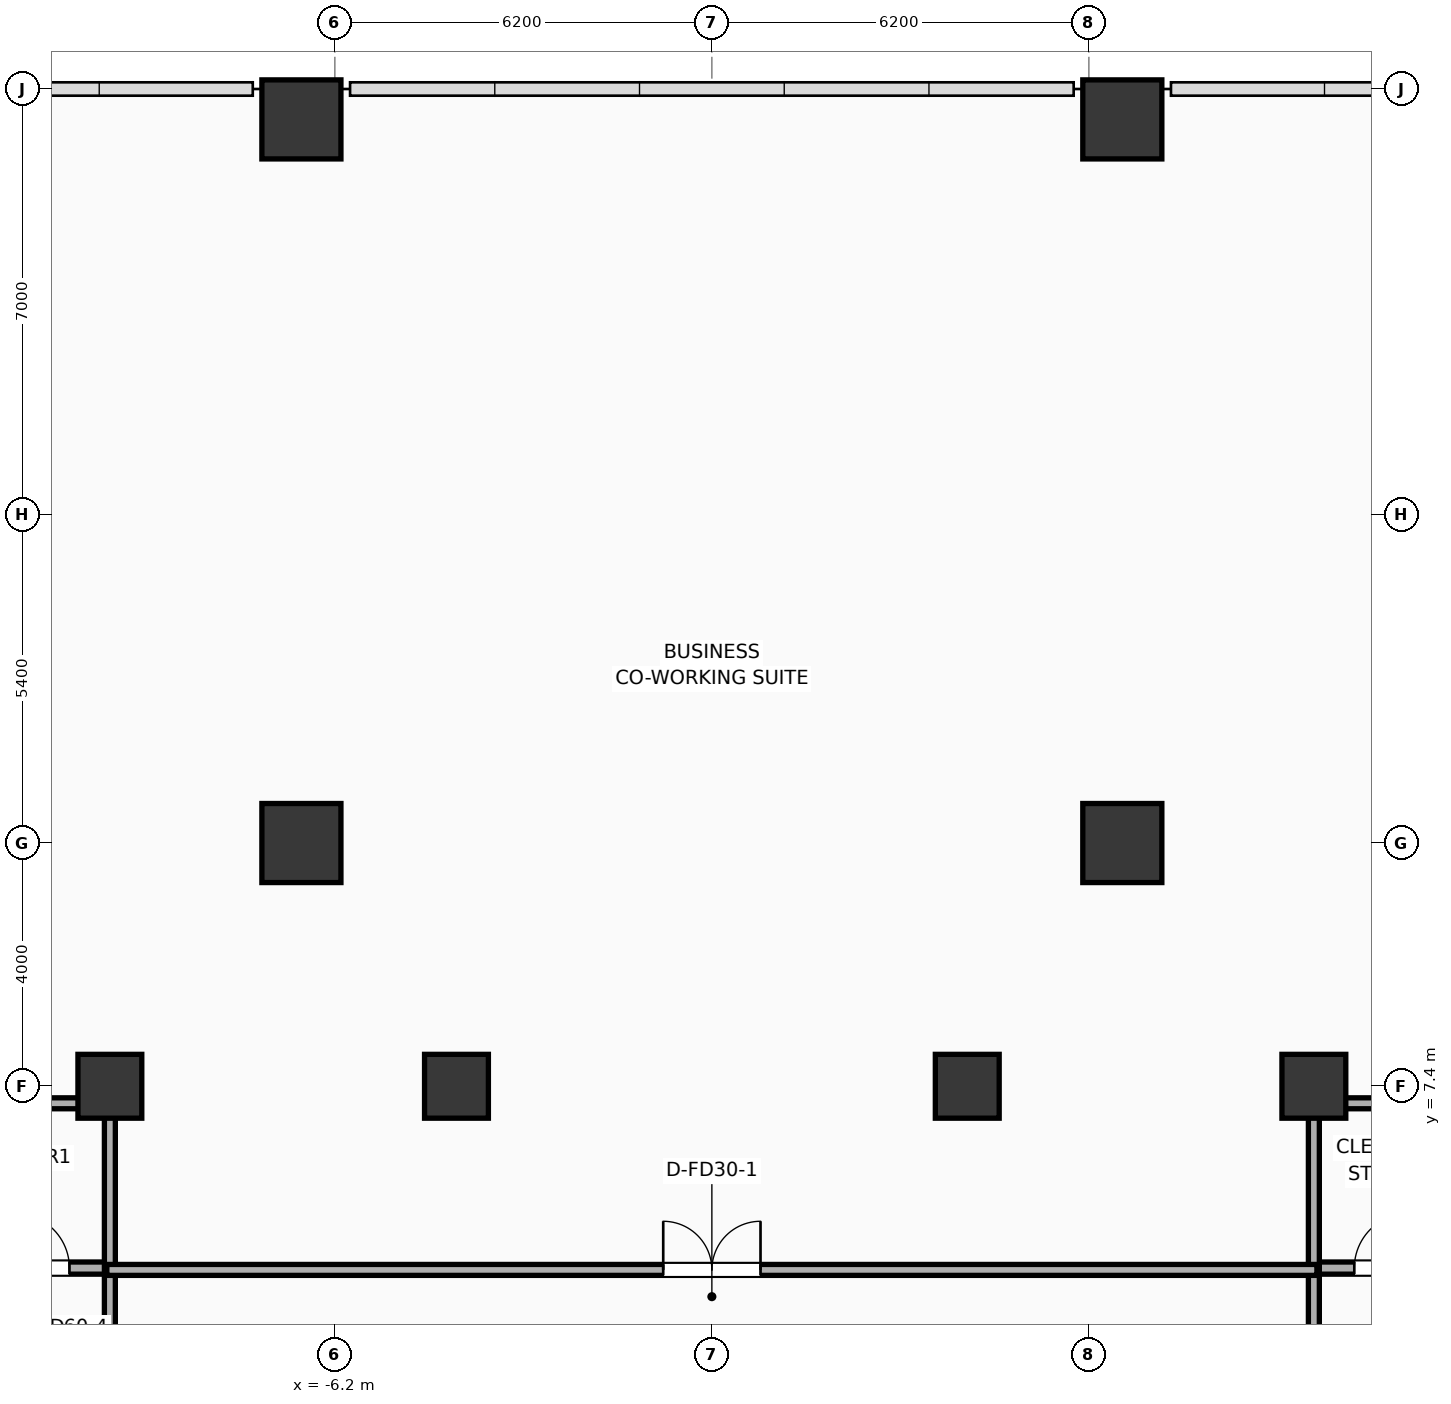
"""IFC4 building model, lengths in metres.
Left out: names, types, materials, properties, quantities, classifications, styles, units other than length and angle.
Written with IfcOpenShell. Run it as: python <this file> out.ifc"""

import sys

from ifc_helpers import new_model, si_unit, direction, frame, frame_2d, origin, origin_2d, place, context, subcontext, project, spatial, rectangle, extrude, element, fill, save


model = new_model("IFC4")
c1 = context("Model", 3, precision=1e-05, world=origin(), true_north=direction((0.0, 1.0)))
c2 = subcontext(c1, "Body", "Model", "MODEL_VIEW")
j1 = project(units=[si_unit("LENGTHUNIT", "METRE"), si_unit("PLANEANGLEUNIT", "RADIAN")], contexts=[c1])
p1 = place(None, origin())
s1 = spatial("IfcSite", under=j1, at=p1, CompositionType="ELEMENT")
p2 = place(p1, origin())
s2 = spatial("IfcBuilding", under=s1, at=p2, CompositionType="ELEMENT")
p3 = place(p2, frame((0.0, 0.0, 20.8)))
s3 = spatial("IfcBuildingStorey", under=s2, at=p3, CompositionType="ELEMENT", Elevation=20.8)
for number, where, z_axis, x_axis in (
    (1, (-6.75, 11.4, 0.0), (0.0, 0.0, 1.0), (1.0, 0.0, 0.0)),
    (2, (-6.75, 23.3, 0.0), (0.0, 0.0, 1.0), (1.0, 0.0, 0.0)),
    (3, (6.75, 11.4, 0.0), (0.0, 0.0, 1.0), (1.0, 0.0, 0.0)),
    (4, (6.75, 23.3, 0.0), (0.0, 0.0, 1.0), (1.0, 0.0, 0.0)),
):
    element("IfcColumn", number, at=place(p3, frame(where, z_axis=z_axis, x_axis=x_axis)), inside=s3, PredefinedType="COLUMN", context=c2, shape_type="SweptSolid", body=[
        extrude(rectangle(XDim=1.3, YDim=1.3, at=origin_2d()), origin(), (0.0, 0.0, 1.0), 5.2),
    ])
for number, where, z_axis, x_axis in (
    (5, (-9.9, 7.4, 0.0), (0.0, 0.0, 1.0), (1.0, 0.0, 0.0)),
    (6, (9.9, 7.4, 0.0), (0.0, 0.0, 1.0), (1.0, 0.0, 0.0)),
    (7, (-4.2, 7.4, 0.0), (0.0, 0.0, 1.0), (1.0, 0.0, 0.0)),
    (8, (4.2, 7.4, 0.0), (0.0, 0.0, 1.0), (1.0, 0.0, 0.0)),
):
    element("IfcColumn", number, at=place(p3, frame(where, z_axis=z_axis, x_axis=x_axis)), inside=s3, PredefinedType="COLUMN", context=c2, shape_type="SweptSolid", body=[
        extrude(rectangle(XDim=1.05, YDim=1.05, at=origin_2d()), origin(), (0.0, 0.0, 1.0), 5.2),
    ])
p4 = place(p3, frame((-12.15, 4.41, 0.0), z_axis=(0.0, 0.0, 1.0), x_axis=(1.0, 0.0, 0.0)))
e9 = element("IfcWall", 9, at=p4, inside=s3, PredefinedType="PARTITIONING", context=c2, shape_type="SweptSolid", body=[
    extrude(rectangle(XDim=2.27, YDim=0.2, at=frame_2d((1.135, 0.0))), origin(), (0.0, 0.0, 1.0), 4.95),
])
p5 = place(p4, frame((0.685, 0.0, 0.0)))
e10 = element("IfcOpeningElement", 10, at=p5, cuts=e9, PredefinedType="OPENING", context=c2, shape_type="SweptSolid", body=[
    extrude(rectangle(XDim=0.9, YDim=2.05, at=frame_2d((0.45, 1.025))), frame((0.0, 0.11, 0.0), z_axis=(0.0, -1.0, 0.0), x_axis=(1.0, 0.0, 0.0)), (0.0, 0.0, 1.0), 0.22),
])
p6 = place(p3, frame((-12.15, 7.12, 0.0), z_axis=(0.0, 0.0, 1.0), x_axis=(1.0, 0.0, 0.0)))
e11 = element("IfcWall", 11, at=p6, inside=s3, PredefinedType="PARTITIONING", context=c2, shape_type="SweptSolid", body=[
    extrude(rectangle(XDim=2.27, YDim=0.18, at=frame_2d((1.135, 0.0))), origin(), (0.0, 0.0, 1.0), 4.95),
])
p7 = place(p3, frame((9.88, 4.41, 0.0), z_axis=(0.0, 0.0, 1.0), x_axis=(1.0, 0.0, 0.0)))
e12 = element("IfcWall", 12, at=p7, inside=s3, PredefinedType="PARTITIONING", context=c2, shape_type="SweptSolid", body=[
    extrude(rectangle(XDim=2.27, YDim=0.2, at=frame_2d((1.135, 0.0))), origin(), (0.0, 0.0, 1.0), 4.95),
])
p8 = place(p7, frame((0.685, 0.0, 0.0)))
e13 = element("IfcOpeningElement", 13, at=p8, cuts=e12, PredefinedType="OPENING", context=c2, shape_type="SweptSolid", body=[
    extrude(rectangle(XDim=0.9, YDim=2.05, at=frame_2d((0.45, 1.025))), frame((0.0, 0.11, 0.0), z_axis=(0.0, -1.0, 0.0), x_axis=(1.0, 0.0, 0.0)), (0.0, 0.0, 1.0), 0.22),
])
p9 = place(p3, frame((9.88, 7.12, 0.0), z_axis=(0.0, 0.0, 1.0), x_axis=(1.0, 0.0, 0.0)))
e14 = element("IfcWall", 14, at=p9, inside=s3, PredefinedType="PARTITIONING", context=c2, shape_type="SweptSolid", body=[
    extrude(rectangle(XDim=2.27, YDim=0.18, at=frame_2d((1.135, 0.0))), origin(), (0.0, 0.0, 1.0), 4.95),
])
p10 = place(p3, frame((-9.9, -7.12, 0.0), z_axis=(0.0, 0.0, 1.0), x_axis=(0.0, 1.0, 0.0)))
e15 = element("IfcWall", 15, at=p10, inside=s3, PredefinedType="PARTITIONING", context=c2, shape_type="SweptSolid", body=[
    extrude(rectangle(XDim=14.24, YDim=0.18, at=frame_2d((7.12, 0.0))), origin(), (0.0, 0.0, 1.0), 4.95),
])
p11 = place(p10, frame((6.32, 0.0, 0.0)))
e16 = element("IfcOpeningElement", 16, at=p11, cuts=e15, PredefinedType="OPENING", context=c2, shape_type="SweptSolid", body=[
    extrude(rectangle(XDim=1.6, YDim=2.05, at=frame_2d((0.8, 1.025))), frame((0.0, 0.1, 0.0), z_axis=(0.0, -1.0, 0.0), x_axis=(1.0, 0.0, 0.0)), (0.0, 0.0, 1.0), 0.2),
])
p12 = place(p3, frame((9.9, -7.12, 0.0), z_axis=(0.0, 0.0, 1.0), x_axis=(0.0, 1.0, 0.0)))
e17 = element("IfcWall", 17, at=p12, inside=s3, PredefinedType="PARTITIONING", context=c2, shape_type="SweptSolid", body=[
    extrude(rectangle(XDim=14.24, YDim=0.18, at=frame_2d((7.12, 0.0))), origin(), (0.0, 0.0, 1.0), 4.95),
])
p13 = place(p12, frame((6.32, 0.0, 0.0)))
e18 = element("IfcOpeningElement", 18, at=p13, cuts=e17, PredefinedType="OPENING", context=c2, shape_type="SweptSolid", body=[
    extrude(rectangle(XDim=1.6, YDim=2.05, at=frame_2d((0.8, 1.025))), frame((0.0, 0.1, 0.0), z_axis=(0.0, -1.0, 0.0), x_axis=(1.0, 0.0, 0.0)), (0.0, 0.0, 1.0), 0.2),
])
p14 = place(p3, frame((-9.95, 4.38, 0.0), z_axis=(0.0, 0.0, 1.0), x_axis=(1.0, 0.0, 0.0)))
e19 = element("IfcWall", 19, at=p14, inside=s3, PredefinedType="PARTITIONING", context=c2, shape_type="SweptSolid", body=[
    extrude(rectangle(XDim=19.9, YDim=0.18, at=frame_2d((9.95, 0.0))), origin(), (0.0, 0.0, 1.0), 4.95),
])
p15 = place(p14, frame((9.15, 0.0, 0.0)))
e20 = element("IfcOpeningElement", 20, at=p15, cuts=e19, PredefinedType="OPENING", context=c2, shape_type="SweptSolid", body=[
    extrude(rectangle(XDim=1.6, YDim=2.05, at=frame_2d((0.8, 1.025))), frame((0.0, 0.1, 0.0), z_axis=(0.0, -1.0, 0.0), x_axis=(1.0, 0.0, 0.0)), (0.0, 0.0, 1.0), 0.2),
])
p16 = place(p5, origin())
e21 = element("IfcDoor", 21, at=p16, inside=s3, OperationType="SINGLE_SWING_LEFT", PredefinedType="DOOR", context=c2, shape_type="SweptSolid", body=[
    extrude(rectangle(XDim=0.9, YDim=2.05, at=frame_2d((0.45, 1.025))), frame((0.0, 0.025, 0.0), z_axis=(0.0, -1.0, 0.0), x_axis=(1.0, 0.0, 0.0)), (0.0, 0.0, 1.0), 0.05),
])
fill(e10, e21)
p17 = place(p8, origin())
e22 = element("IfcDoor", 22, at=p17, inside=s3, OperationType="SINGLE_SWING_RIGHT", PredefinedType="DOOR", context=c2, shape_type="SweptSolid", body=[
    extrude(rectangle(XDim=0.9, YDim=2.05, at=frame_2d((0.45, 1.025))), frame((0.0, 0.025, 0.0), z_axis=(0.0, -1.0, 0.0), x_axis=(1.0, 0.0, 0.0)), (0.0, 0.0, 1.0), 0.05),
])
fill(e13, e22)
p18 = place(p15, origin())
e23 = element("IfcDoor", 23, at=p18, inside=s3, OperationType="DOUBLE_DOOR_SINGLE_SWING", PredefinedType="DOOR", context=c2, shape_type="SweptSolid", body=[
    extrude(rectangle(XDim=1.6, YDim=2.05, at=frame_2d((0.8, 1.025))), frame((0.0, 0.025, 0.0), z_axis=(0.0, -1.0, 0.0), x_axis=(1.0, 0.0, 0.0)), (0.0, 0.0, 1.0), 0.05),
])
fill(e20, e23)
save(model, sys.argv[1])
